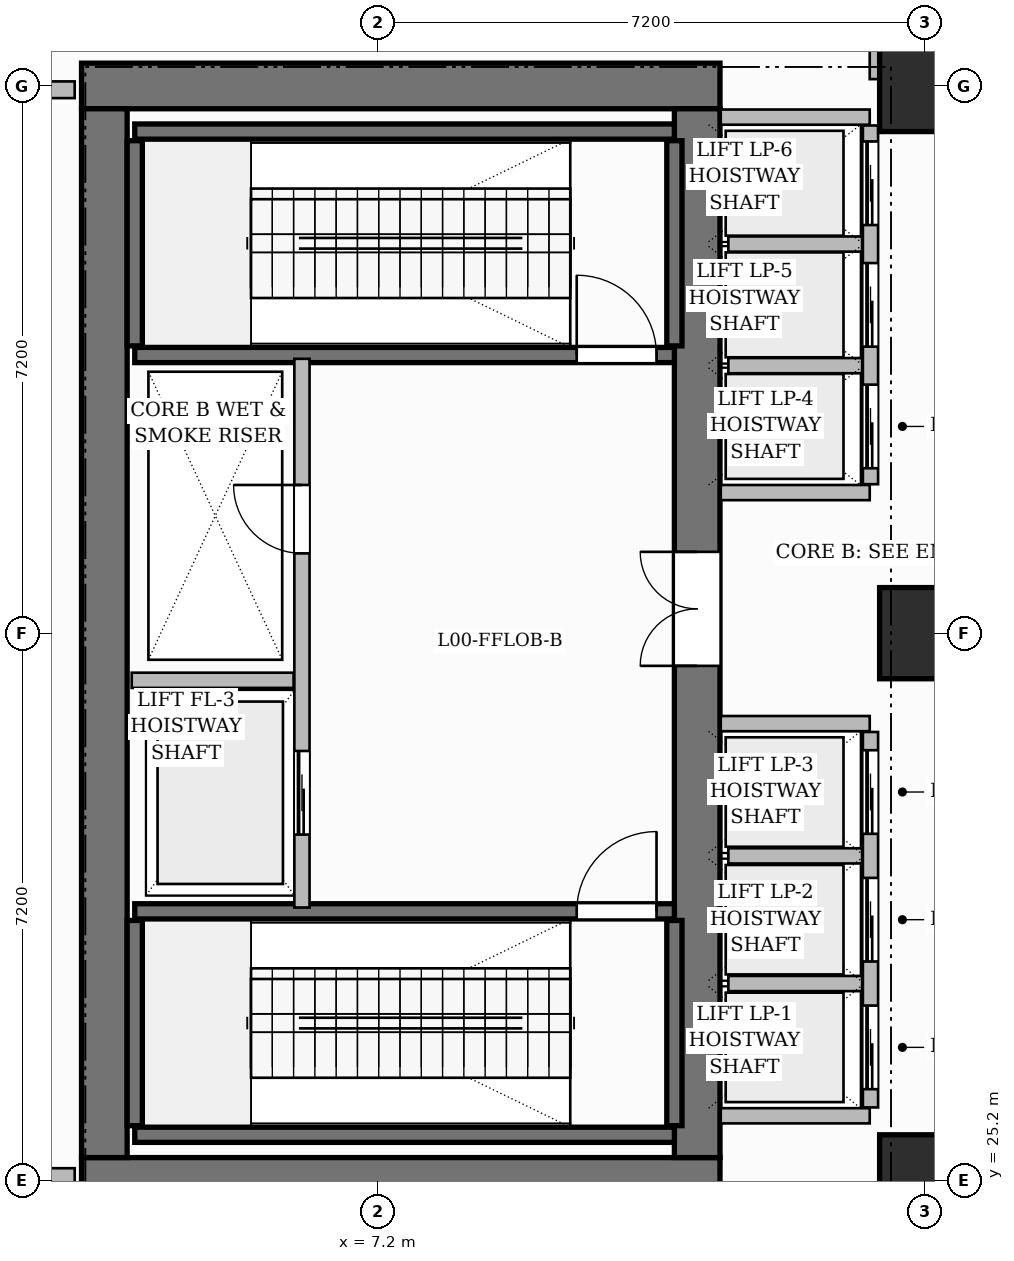
"""IFC4 building model, lengths in metres.
Left out: names, types, materials, properties, quantities, classifications, styles, units other than length and angle.
Written with IfcOpenShell. Run it as: python <this file> out.ifc"""

import sys

from ifc_helpers import new_model, si_unit, direction, frame, frame_2d, origin, origin_2d, place, context, subcontext, project, spatial, rectangle, extrude, source, transform, mapped, element, fill, save


model = new_model("IFC4")
c1 = context("Model", 3, precision=1e-05, world=origin(), true_north=direction((0.0, 1.0)))
c2 = subcontext(c1, "Body", "Model", "MODEL_VIEW")
j1 = project(units=[si_unit("LENGTHUNIT", "METRE"), si_unit("PLANEANGLEUNIT", "RADIAN")], contexts=[c1])
p1 = place(None, origin())
s1 = spatial("IfcSite", under=j1, at=p1, CompositionType="ELEMENT")
p2 = place(p1, origin())
s2 = spatial("IfcBuilding", under=s1, at=p2, CompositionType="ELEMENT")
p3 = place(p2, origin())
s3 = spatial("IfcBuildingStorey", under=s2, at=p3, CompositionType="ELEMENT", Elevation=0.0)
for number, where, z_axis, x_axis in (
    (1, (3.3, 25.2, 0.0), (0.0, 0.0, 1.0), (1.0, 0.0, 0.0)),
    (2, (3.3, 39.6, 0.0), (0.0, 0.0, 1.0), (1.0, 0.0, 0.0)),
):
    element("IfcWall", number, at=place(p3, frame(where, z_axis=z_axis, x_axis=x_axis)), inside=s3, PredefinedType="SHEAR", context=c2, shape_type="SweptSolid", body=[
        extrude(rectangle(XDim=8.4, YDim=0.6, at=frame_2d((4.2, 0.0))), origin(), (0.0, 0.0, 1.0), 5.4),
    ])
p4 = place(p3, frame((3.6, 25.5, 0.0), z_axis=(0.0, 0.0, 1.0), x_axis=(0.0, 1.0, 0.0)))
e3 = element("IfcWall", 3, at=p4, inside=s3, PredefinedType="SHEAR", context=c2, shape_type="SweptSolid", body=[
    extrude(rectangle(XDim=13.8, YDim=0.6, at=frame_2d((6.9, 0.0))), origin(), (0.0, 0.0, 1.0), 5.4),
])
p5 = place(p3, frame((11.4, 25.5, 0.0), z_axis=(0.0, 0.0, 1.0), x_axis=(0.0, 1.0, 0.0)))
e4 = element("IfcWall", 4, at=p5, inside=s3, PredefinedType="SHEAR", context=c2, shape_type="SweptSolid", body=[
    extrude(rectangle(XDim=13.8, YDim=0.6, at=frame_2d((6.9, 0.0))), origin(), (0.0, 0.0, 1.0), 5.4),
])
p6 = place(p5, frame((6.47, 0.0, 0.0)))
e5 = element("IfcOpeningElement", 5, at=p6, cuts=e4, PredefinedType="OPENING", context=c2, shape_type="SweptSolid", body=[
    extrude(rectangle(XDim=1.5, YDim=2.2, at=frame_2d((0.75, 1.1))), frame((0.0, 0.31, 0.0), z_axis=(0.0, -1.0, 0.0), x_axis=(1.0, 0.0, 0.0)), (0.0, 0.0, 1.0), 0.62),
])
m1 = source(origin(), c2, "Body", "SweptSolid", [
    extrude(rectangle(XDim=1.2, YDim=1.2, at=origin_2d()), origin(), (0.0, 0.0, 1.0), 5.4),
])
for number, where, z_axis, x_axis in (
    (6, (14.4, 25.2, 0.0), (0.0, 0.0, 1.0), (1.0, 0.0, 0.0)),
    (7, (14.4, 32.4, 0.0), (0.0, 0.0, 1.0), (1.0, 0.0, 0.0)),
    (8, (14.4, 39.6, 0.0), (0.0, 0.0, 1.0), (1.0, 0.0, 0.0)),
):
    element("IfcColumn", number, at=place(p3, frame(where, z_axis=z_axis, x_axis=x_axis)), inside=s3, PredefinedType="COLUMN", context=c2, shape_type="MappedRepresentation", body=[
        mapped(m1, transform((0.0, 0.0, 0.0), scale=1.0)),
    ])
p7 = place(p3, frame((4.0, 25.8, 0.0), z_axis=(0.0, 0.0, 1.0), x_axis=(1.0, 0.0, 0.0)))
e9 = element("IfcWall", 9, at=p7, inside=s3, PredefinedType="SHEAR", context=c2, shape_type="SweptSolid", body=[
    extrude(rectangle(XDim=7.1, YDim=0.2, at=frame_2d((3.55, 0.0))), origin(), (0.0, 0.0, 1.0), 5.4),
])
for number, where, z_axis, x_axis in (
    (10, (4.0, 25.92, 0.0), (0.0, 0.0, 1.0), (0.0, 1.0, 0.0)),
    (11, (11.1, 25.92, 0.0), (0.0, 0.0, 1.0), (0.0, 1.0, 0.0)),
):
    element("IfcWall", number, at=place(p3, frame(where, z_axis=z_axis, x_axis=x_axis)), inside=s3, PredefinedType="SHEAR", context=c2, shape_type="SweptSolid", body=[
        extrude(rectangle(XDim=2.7, YDim=0.2, at=frame_2d((1.35, 0.0))), origin(), (0.0, 0.0, 1.0), 5.4),
    ])
p8 = place(p3, frame((4.0, 28.74, 0.0), z_axis=(0.0, 0.0, 1.0), x_axis=(1.0, 0.0, 0.0)))
e12 = element("IfcWall", 12, at=p8, inside=s3, PredefinedType="SHEAR", context=c2, shape_type="SweptSolid", body=[
    extrude(rectangle(XDim=7.1, YDim=0.2, at=frame_2d((3.55, 0.0))), origin(), (0.0, 0.0, 1.0), 5.4),
])
p9 = place(p8, frame((5.815, 0.0, 0.0)))
e13 = element("IfcOpeningElement", 13, at=p9, cuts=e12, PredefinedType="OPENING", context=c2, shape_type="SweptSolid", body=[
    extrude(rectangle(XDim=1.05, YDim=2.2, at=frame_2d((0.525, 1.1))), frame((0.0, 0.11, 0.0), z_axis=(0.0, -1.0, 0.0), x_axis=(1.0, 0.0, 0.0)), (0.0, 0.0, 1.0), 0.22),
])
p10 = place(p3, frame((4.0, 39.0, 0.0), z_axis=(0.0, 0.0, 1.0), x_axis=(1.0, 0.0, 0.0)))
e14 = element("IfcWall", 14, at=p10, inside=s3, PredefinedType="SHEAR", context=c2, shape_type="SweptSolid", body=[
    extrude(rectangle(XDim=7.1, YDim=0.2, at=frame_2d((3.55, 0.0))), origin(), (0.0, 0.0, 1.0), 5.4),
])
for number, where, z_axis, x_axis in (
    (15, (4.0, 36.18, 0.0), (0.0, 0.0, 1.0), (0.0, 1.0, 0.0)),
    (16, (11.1, 36.18, 0.0), (0.0, 0.0, 1.0), (0.0, 1.0, 0.0)),
):
    element("IfcWall", number, at=place(p3, frame(where, z_axis=z_axis, x_axis=x_axis)), inside=s3, PredefinedType="SHEAR", context=c2, shape_type="SweptSolid", body=[
        extrude(rectangle(XDim=2.7, YDim=0.2, at=frame_2d((1.35, 0.0))), origin(), (0.0, 0.0, 1.0), 5.4),
    ])
p11 = place(p3, frame((4.0, 36.06, 0.0), z_axis=(0.0, 0.0, 1.0), x_axis=(1.0, 0.0, 0.0)))
e17 = element("IfcWall", 17, at=p11, inside=s3, PredefinedType="SHEAR", context=c2, shape_type="SweptSolid", body=[
    extrude(rectangle(XDim=7.1, YDim=0.2, at=frame_2d((3.55, 0.0))), origin(), (0.0, 0.0, 1.0), 5.4),
])
p12 = place(p11, frame((5.815, 0.0, 0.0)))
e18 = element("IfcOpeningElement", 18, at=p12, cuts=e17, PredefinedType="OPENING", context=c2, shape_type="SweptSolid", body=[
    extrude(rectangle(XDim=1.05, YDim=2.2, at=frame_2d((0.525, 1.1))), frame((0.0, 0.11, 0.0), z_axis=(0.0, -1.0, 0.0), x_axis=(1.0, 0.0, 0.0)), (0.0, 0.0, 1.0), 0.22),
])
p13 = place(p3, frame((6.2, 28.79, 0.0), z_axis=(0.0, 0.0, 1.0), x_axis=(0.0, 1.0, 0.0)))
e19 = element("IfcWall", 19, at=p13, inside=s3, PredefinedType="PARTITIONING", context=c2, shape_type="SweptSolid", body=[
    extrude(rectangle(XDim=7.22, YDim=0.2, at=frame_2d((3.61, 0.0))), origin(), (0.0, 0.0, 1.0), 5.1),
])
p14 = place(p13, frame((4.66, 0.0, 0.0)))
e20 = element("IfcOpeningElement", 20, at=p14, cuts=e19, PredefinedType="OPENING", context=c2, shape_type="SweptSolid", body=[
    extrude(rectangle(XDim=0.9, YDim=2.1, at=frame_2d((0.45, 1.05))), frame((0.0, 0.11, 0.0), z_axis=(0.0, -1.0, 0.0), x_axis=(1.0, 0.0, 0.0)), (0.0, 0.0, 1.0), 0.22),
])
p15 = place(p13, frame((0.96, 0.0, 0.0)))
e21 = element("IfcOpeningElement", 21, at=p15, cuts=e19, PredefinedType="OPENING", context=c2, shape_type="SweptSolid", body=[
    extrude(rectangle(XDim=1.1, YDim=2.2, at=frame_2d((0.55, 1.1))), frame((0.0, 0.11, 0.0), z_axis=(0.0, -1.0, 0.0), x_axis=(1.0, 0.0, 0.0)), (0.0, 0.0, 1.0), 0.22),
])
p16 = place(p3, frame((3.96, 31.78, 0.0), z_axis=(0.0, 0.0, 1.0), x_axis=(1.0, 0.0, 0.0)))
e22 = element("IfcWall", 22, at=p16, inside=s3, PredefinedType="PARTITIONING", context=c2, shape_type="SweptSolid", body=[
    extrude(rectangle(XDim=2.13, YDim=0.2, at=frame_2d((1.065, 0.0))), origin(), (0.0, 0.0, 1.0), 5.1),
])
for number, where, z_axis, x_axis in (
    (23, (11.71, 26.05, 0.0), (0.0, 0.0, 1.0), (1.0, 0.0, 0.0)),
    (24, (11.71, 31.21, 0.0), (0.0, 0.0, 1.0), (1.0, 0.0, 0.0)),
):
    element("IfcWall", number, at=place(p3, frame(where, z_axis=z_axis, x_axis=x_axis)), inside=s3, PredefinedType="PARTITIONING", context=c2, shape_type="SweptSolid", body=[
        extrude(rectangle(XDim=1.96, YDim=0.2, at=frame_2d((0.98, 0.0))), origin(), (0.0, 0.0, 1.0), 5.1),
    ])
p17 = place(p3, frame((13.68, 26.16, 0.0), z_axis=(0.0, 0.0, 1.0), x_axis=(0.0, 1.0, 0.0)))
e25 = element("IfcWall", 25, at=p17, inside=s3, PredefinedType="PARTITIONING", context=c2, shape_type="SweptSolid", body=[
    extrude(rectangle(XDim=4.94, YDim=0.2, at=frame_2d((2.47, 0.0))), origin(), (0.0, 0.0, 1.0), 5.1),
])
p18 = place(p17, frame((0.24, 0.0, 0.0)))
e26 = element("IfcOpeningElement", 26, at=p18, cuts=e25, PredefinedType="OPENING", context=c2, shape_type="SweptSolid", body=[
    extrude(rectangle(XDim=1.1, YDim=2.2, at=frame_2d((0.55, 1.1))), frame((0.0, 0.11, 0.0), z_axis=(0.0, -1.0, 0.0), x_axis=(1.0, 0.0, 0.0)), (0.0, 0.0, 1.0), 0.22),
])
p19 = place(p17, frame((1.92, 0.0, 0.0)))
e27 = element("IfcOpeningElement", 27, at=p19, cuts=e25, PredefinedType="OPENING", context=c2, shape_type="SweptSolid", body=[
    extrude(rectangle(XDim=1.1, YDim=2.2, at=frame_2d((0.55, 1.1))), frame((0.0, 0.11, 0.0), z_axis=(0.0, -1.0, 0.0), x_axis=(1.0, 0.0, 0.0)), (0.0, 0.0, 1.0), 0.22),
])
p20 = place(p17, frame((3.6, 0.0, 0.0)))
e28 = element("IfcOpeningElement", 28, at=p20, cuts=e25, PredefinedType="OPENING", context=c2, shape_type="SweptSolid", body=[
    extrude(rectangle(XDim=1.1, YDim=2.2, at=frame_2d((0.55, 1.1))), frame((0.0, 0.11, 0.0), z_axis=(0.0, -1.0, 0.0), x_axis=(1.0, 0.0, 0.0)), (0.0, 0.0, 1.0), 0.22),
])
for number, where, z_axis, x_axis in (
    (29, (11.81, 27.79, 0.0), (0.0, 0.0, 1.0), (1.0, 0.0, 0.0)),
    (30, (11.81, 29.47, 0.0), (0.0, 0.0, 1.0), (1.0, 0.0, 0.0)),
):
    element("IfcWall", number, at=place(p3, frame(where, z_axis=z_axis, x_axis=x_axis)), inside=s3, PredefinedType="PARTITIONING", context=c2, shape_type="SweptSolid", body=[
        extrude(rectangle(XDim=1.76, YDim=0.2, at=frame_2d((0.88, 0.0))), origin(), (0.0, 0.0, 1.0), 5.1),
    ])
for number, where, z_axis, x_axis in (
    (31, (11.71, 34.25, 0.0), (0.0, 0.0, 1.0), (1.0, 0.0, 0.0)),
    (32, (11.71, 39.19, 0.0), (0.0, 0.0, 1.0), (1.0, 0.0, 0.0)),
):
    element("IfcWall", number, at=place(p3, frame(where, z_axis=z_axis, x_axis=x_axis)), inside=s3, PredefinedType="PARTITIONING", context=c2, shape_type="SweptSolid", body=[
        extrude(rectangle(XDim=1.96, YDim=0.2, at=frame_2d((0.98, 0.0))), origin(), (0.0, 0.0, 1.0), 5.1),
    ])
p21 = place(p3, frame((13.68, 34.36, 0.0), z_axis=(0.0, 0.0, 1.0), x_axis=(0.0, 1.0, 0.0)))
e33 = element("IfcWall", 33, at=p21, inside=s3, PredefinedType="PARTITIONING", context=c2, shape_type="SweptSolid", body=[
    extrude(rectangle(XDim=4.72, YDim=0.2, at=frame_2d((2.36, 0.0))), origin(), (0.0, 0.0, 1.0), 5.1),
])
p22 = place(p21, frame((0.21, 0.0, 0.0)))
e34 = element("IfcOpeningElement", 34, at=p22, cuts=e33, PredefinedType="OPENING", context=c2, shape_type="SweptSolid", body=[
    extrude(rectangle(XDim=1.1, YDim=2.2, at=frame_2d((0.55, 1.1))), frame((0.0, 0.11, 0.0), z_axis=(0.0, -1.0, 0.0), x_axis=(1.0, 0.0, 0.0)), (0.0, 0.0, 1.0), 0.22),
])
p23 = place(p21, frame((1.81, 0.0, 0.0)))
e35 = element("IfcOpeningElement", 35, at=p23, cuts=e33, PredefinedType="OPENING", context=c2, shape_type="SweptSolid", body=[
    extrude(rectangle(XDim=1.1, YDim=2.2, at=frame_2d((0.55, 1.1))), frame((0.0, 0.11, 0.0), z_axis=(0.0, -1.0, 0.0), x_axis=(1.0, 0.0, 0.0)), (0.0, 0.0, 1.0), 0.22),
])
p24 = place(p21, frame((3.41, 0.0, 0.0)))
e36 = element("IfcOpeningElement", 36, at=p24, cuts=e33, PredefinedType="OPENING", context=c2, shape_type="SweptSolid", body=[
    extrude(rectangle(XDim=1.1, YDim=2.2, at=frame_2d((0.55, 1.1))), frame((0.0, 0.11, 0.0), z_axis=(0.0, -1.0, 0.0), x_axis=(1.0, 0.0, 0.0)), (0.0, 0.0, 1.0), 0.22),
])
for number, where, z_axis, x_axis in (
    (37, (11.81, 35.92, 0.0), (0.0, 0.0, 1.0), (1.0, 0.0, 0.0)),
    (38, (11.81, 37.52, 0.0), (0.0, 0.0, 1.0), (1.0, 0.0, 0.0)),
):
    element("IfcWall", number, at=place(p3, frame(where, z_axis=z_axis, x_axis=x_axis)), inside=s3, PredefinedType="PARTITIONING", context=c2, shape_type="SweptSolid", body=[
        extrude(rectangle(XDim=1.76, YDim=0.2, at=frame_2d((0.88, 0.0))), origin(), (0.0, 0.0, 1.0), 5.1),
    ])
p25 = place(p3, frame((-4.41, 25.25, 0.0), z_axis=(0.0, 0.0, 1.0), x_axis=(1.0, 0.0, 0.0)))
e39 = element("IfcWall", 39, at=p25, inside=s3, PredefinedType="PARTITIONING", context=c2, shape_type="SweptSolid", body=[
    extrude(rectangle(XDim=7.62, YDim=0.22, at=frame_2d((3.81, 0.0))), origin(), (0.0, 0.0, 1.0), 4.085),
])
p26 = place(p25, frame((2.144, 0.0, 0.0)))
e40 = element("IfcOpeningElement", 40, at=p26, cuts=e39, PredefinedType="OPENING", context=c2, shape_type="SweptSolid", body=[
    extrude(rectangle(XDim=1.5, YDim=2.2, at=frame_2d((0.75, 1.1))), frame((0.0, 0.12, 0.0), z_axis=(0.0, -1.0, 0.0), x_axis=(1.0, 0.0, 0.0)), (0.0, 0.0, 1.0), 0.24),
])
p27 = place(p3, frame((-4.41, 39.55, 0.0), z_axis=(0.0, 0.0, 1.0), x_axis=(1.0, 0.0, 0.0)))
e41 = element("IfcWall", 41, at=p27, inside=s3, PredefinedType="PARTITIONING", context=c2, shape_type="SweptSolid", body=[
    extrude(rectangle(XDim=7.62, YDim=0.22, at=frame_2d((3.81, 0.0))), origin(), (0.0, 0.0, 1.0), 4.085),
])
p28 = place(p3, frame((13.84, 39.6, 0.0), z_axis=(0.0, 0.0, 1.0), x_axis=(1.0, 0.0, 0.0)))
e42 = element("IfcWall", 42, at=p28, inside=s3, PredefinedType="PARTITIONING", context=c2, shape_type="SweptSolid", body=[
    extrude(rectangle(XDim=7.92, YDim=0.16, at=frame_2d((3.96, 0.0))), origin(), (0.0, 0.0, 1.0), 4.085),
])
p29 = place(p28, frame((1.22, 0.0, 0.0)))
e43 = element("IfcOpeningElement", 43, at=p29, cuts=e42, PredefinedType="OPENING", context=c2, shape_type="SweptSolid", body=[
    extrude(rectangle(XDim=1.6, YDim=2.4, at=frame_2d((0.8, 1.2))), frame((0.0, 0.09, 0.0), z_axis=(0.0, -1.0, 0.0), x_axis=(1.0, 0.0, 0.0)), (0.0, 0.0, 1.0), 0.18),
])
p30 = place(p3, frame((13.75, 39.69, 0.0), z_axis=(0.0, 0.0, 1.0), x_axis=(0.0, 1.0, 0.0)))
e44 = element("IfcWall", 44, at=p30, inside=s3, PredefinedType="PARTITIONING", context=c2, shape_type="SweptSolid", body=[
    extrude(rectangle(XDim=6.942, YDim=0.16, at=frame_2d((3.471, 0.0))), origin(), (0.0, 0.0, 1.0), 5.1),
])
p31 = place(p30, frame((2.61, 0.0, 0.0)))
e45 = element("IfcOpeningElement", 45, at=p31, cuts=e44, PredefinedType="OPENING", context=c2, shape_type="SweptSolid", body=[
    extrude(rectangle(XDim=1.4, YDim=2.35, at=frame_2d((0.7, 1.175))), frame((0.0, 0.09, 0.0), z_axis=(0.0, -1.0, 0.0), x_axis=(1.0, 0.0, 0.0)), (0.0, 0.0, 1.0), 0.18),
])
m2 = source(origin(), c2, "Body", "SweptSolid", [
    extrude(rectangle(XDim=1.05, YDim=2.2, at=frame_2d((0.525, 1.1))), frame((0.0, 0.025, 0.0), z_axis=(0.0, -1.0, 0.0), x_axis=(1.0, 0.0, 0.0)), (0.0, 0.0, 1.0), 0.05),
])
p32 = place(p9, origin())
e46 = element("IfcDoor", 46, at=p32, inside=s3, OperationType="SINGLE_SWING_RIGHT", PredefinedType="DOOR", context=c2, shape_type="MappedRepresentation", body=[
    mapped(m2, transform((0.0, 0.0, 0.0), scale=1.0)),
])
fill(e13, e46)
p33 = place(p12, origin())
e47 = element("IfcDoor", 47, at=p33, inside=s3, OperationType="SINGLE_SWING_LEFT", PredefinedType="DOOR", context=c2, shape_type="MappedRepresentation", body=[
    mapped(m2, transform((0.0, 0.0, 0.0), scale=1.0)),
])
fill(e18, e47)
m3 = source(origin(), c2, "Body", "SweptSolid", [
    extrude(rectangle(XDim=0.9, YDim=2.1, at=frame_2d((0.45, 1.05))), frame((0.0, 0.025, 0.0), z_axis=(0.0, -1.0, 0.0), x_axis=(1.0, 0.0, 0.0)), (0.0, 0.0, 1.0), 0.05),
])
p34 = place(p14, origin())
e48 = element("IfcDoor", 48, at=p34, inside=s3, OperationType="SINGLE_SWING_RIGHT", PredefinedType="DOOR", context=c2, shape_type="MappedRepresentation", body=[
    mapped(m3, transform((0.0, 0.0, 0.0), scale=1.0)),
])
fill(e20, e48)
m4 = source(origin(), c2, "Body", "SweptSolid", [
    extrude(rectangle(XDim=1.5, YDim=2.2, at=frame_2d((0.75, 1.1))), frame((0.0, 0.025, 0.0), z_axis=(0.0, -1.0, 0.0), x_axis=(1.0, 0.0, 0.0)), (0.0, 0.0, 1.0), 0.05),
])
p35 = place(p6, origin())
e49 = element("IfcDoor", 49, at=p35, inside=s3, OperationType="DOUBLE_DOOR_SINGLE_SWING", PredefinedType="DOOR", context=c2, shape_type="MappedRepresentation", body=[
    mapped(m4, transform((0.0, 0.0, 0.0), scale=1.0)),
])
fill(e5, e49)
m5 = source(origin(), c2, "Body", "SweptSolid", [
    extrude(rectangle(XDim=1.1, YDim=2.2, at=frame_2d((0.55, 1.1))), frame((0.0, 0.025, 0.0), z_axis=(0.0, -1.0, 0.0), x_axis=(1.0, 0.0, 0.0)), (0.0, 0.0, 1.0), 0.05),
])
p36 = place(p15, origin())
e50 = element("IfcDoor", 50, at=p36, inside=s3, OperationType="SLIDING_TO_LEFT", PredefinedType="DOOR", context=c2, shape_type="MappedRepresentation", body=[
    mapped(m5, transform((0.0, 0.0, 0.0), scale=1.0)),
])
fill(e21, e50)
p37 = place(p18, origin())
e51 = element("IfcDoor", 51, at=p37, inside=s3, OperationType="SLIDING_TO_LEFT", PredefinedType="DOOR", context=c2, shape_type="MappedRepresentation", body=[
    mapped(m5, transform((0.0, 0.0, 0.0), scale=1.0)),
])
fill(e26, e51)
p38 = place(p19, origin())
e52 = element("IfcDoor", 52, at=p38, inside=s3, OperationType="SLIDING_TO_LEFT", PredefinedType="DOOR", context=c2, shape_type="MappedRepresentation", body=[
    mapped(m5, transform((0.0, 0.0, 0.0), scale=1.0)),
])
fill(e27, e52)
p39 = place(p20, origin())
e53 = element("IfcDoor", 53, at=p39, inside=s3, OperationType="SLIDING_TO_LEFT", PredefinedType="DOOR", context=c2, shape_type="MappedRepresentation", body=[
    mapped(m5, transform((0.0, 0.0, 0.0), scale=1.0)),
])
fill(e28, e53)
p40 = place(p22, origin())
e54 = element("IfcDoor", 54, at=p40, inside=s3, OperationType="SLIDING_TO_LEFT", PredefinedType="DOOR", context=c2, shape_type="MappedRepresentation", body=[
    mapped(m5, transform((0.0, 0.0, 0.0), scale=1.0)),
])
fill(e34, e54)
p41 = place(p23, origin())
e55 = element("IfcDoor", 55, at=p41, inside=s3, OperationType="SLIDING_TO_LEFT", PredefinedType="DOOR", context=c2, shape_type="MappedRepresentation", body=[
    mapped(m5, transform((0.0, 0.0, 0.0), scale=1.0)),
])
fill(e35, e55)
p42 = place(p24, origin())
e56 = element("IfcDoor", 56, at=p42, inside=s3, OperationType="SLIDING_TO_LEFT", PredefinedType="DOOR", context=c2, shape_type="MappedRepresentation", body=[
    mapped(m5, transform((0.0, 0.0, 0.0), scale=1.0)),
])
fill(e36, e56)
save(model, sys.argv[1])
